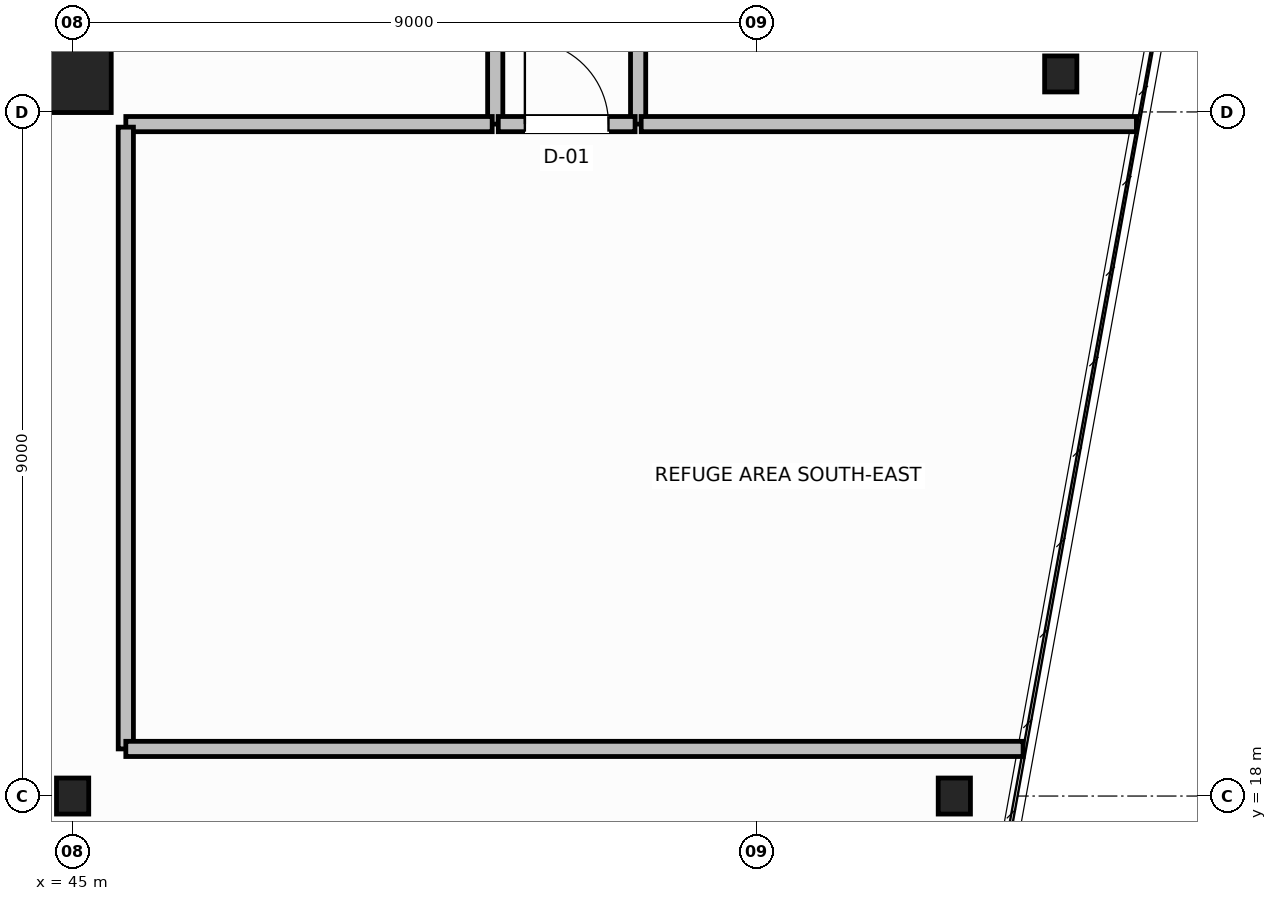
"""IFC4 building model, lengths in metres.
Left out: names, types, materials, properties, quantities, classifications, styles, units other than length and angle.
Written with IfcOpenShell. Run it as: python <this file> out.ifc"""

import sys

from ifc_helpers import new_model, si_unit, direction, frame, frame_2d, origin, origin_2d, place, context, subcontext, project, spatial, rectangle, hollow_circle, i_section, extrude, source, transform, mapped, element, fill, save


model = new_model("IFC4")
c1 = context("Model", 3, precision=1e-05, world=origin(), true_north=direction((0.0, 1.0)))
c2 = subcontext(c1, "Body", "Model", "MODEL_VIEW")
j1 = project(units=[si_unit("LENGTHUNIT", "METRE"), si_unit("PLANEANGLEUNIT", "RADIAN")], contexts=[c1])
p1 = place(None, origin())
s1 = spatial("IfcSite", under=j1, at=p1, CompositionType="ELEMENT")
p2 = place(p1, origin())
s2 = spatial("IfcBuilding", under=s1, at=p2, CompositionType="ELEMENT")
p3 = place(p2, frame((0.0, 0.0, 149.0)))
s3 = spatial("IfcBuildingStorey", under=s2, at=p3, CompositionType="ELEMENT", Elevation=149.0)
m1 = source(origin(), c2, "Body", "SweptSolid", [
    extrude(i_section(OverallWidth=0.424, OverallDepth=0.474, WebThickness=0.047, FlangeThickness=0.065, FilletRadius=0.015, at=origin_2d()), origin(), (0.0, 0.0, 1.0), 4.8),
])
for number, where, z_axis, x_axis in (
    (1, (58.0, 27.5, 0.0), (0.0, 0.0, 1.0), (1.0, 0.0, 0.0)),
    (2, (56.6, 18.0, 0.0), (0.0, 0.0, 1.0), (1.0, 0.0, 0.0)),
):
    element("IfcColumn", number, at=place(p3, frame(where, z_axis=z_axis, x_axis=x_axis)), inside=s3, PredefinedType="COLUMN", context=c2, shape_type="MappedRepresentation", body=[
        mapped(m1, transform((0.0, 0.0, 0.0), scale=1.0)),
    ])
m2 = source(origin(), c2, "Body", "SweptSolid", [
    extrude(hollow_circle(Radius=0.508, WallThickness=0.045, at=origin_2d()), origin(), (0.0, 0.0, 1.0), 4.8),
])
p4 = place(p3, frame((45.0, 27.5, 0.0), z_axis=(0.0, 0.0, 1.0), x_axis=(1.0, 0.0, 0.0)))
e3 = element("IfcColumn", 3, at=p4, inside=s3, PredefinedType="COLUMN", context=c2, shape_type="MappedRepresentation", body=[
    mapped(m2, transform((0.0, 0.0, 0.0), scale=1.0)),
])
m3 = source(origin(), c2, "Body", "SweptSolid", [
    extrude(i_section(OverallWidth=0.424, OverallDepth=0.474, WebThickness=0.047, FlangeThickness=0.065, FilletRadius=0.015, at=origin_2d()), origin(), (0.0, 0.0, 1.0), 4.8),
])
p5 = place(p3, frame((45.0, 18.0, 0.0), z_axis=(0.0, 0.0, 1.0), x_axis=(1.0, 0.0, 0.0)))
e4 = element("IfcColumn", 4, at=p5, inside=s3, PredefinedType="COLUMN", context=c2, shape_type="MappedRepresentation", body=[
    mapped(m3, transform((0.0, 0.0, 0.0), scale=1.0)),
])
p6 = place(p3, frame((50.56, 26.84, 0.0), z_axis=(0.0, 0.0, 1.0), x_axis=(0.0, 1.0, 0.0)))
e5 = element("IfcWall", 5, at=p6, inside=s3, PredefinedType="SOLIDWALL", context=c2, shape_type="SweptSolid", body=[
    extrude(rectangle(XDim=6.92, YDim=0.2, at=frame_2d((3.46, 0.0))), origin(), (0.0, 0.0, 1.0), 4.54),
])
p7 = place(p6, frame((3.0, 0.0, 0.0)))
e6 = element("IfcOpeningElement", 6, at=p7, cuts=e5, PredefinedType="OPENING", context=c2, shape_type="SweptSolid", body=[
    extrude(rectangle(XDim=1.1, YDim=2.15, at=frame_2d((0.55, 1.075))), frame((0.0, 0.11, 0.0), z_axis=(0.0, -1.0, 0.0), x_axis=(1.0, 0.0, 0.0)), (0.0, 0.0, 1.0), 0.22),
])
p8 = place(p3, frame((52.44, 26.84, 0.0), z_axis=(0.0, 0.0, 1.0), x_axis=(0.0, 1.0, 0.0)))
e7 = element("IfcWall", 7, at=p8, inside=s3, PredefinedType="SOLIDWALL", context=c2, shape_type="SweptSolid", body=[
    extrude(rectangle(XDim=6.92, YDim=0.2, at=frame_2d((3.46, 0.0))), origin(), (0.0, 0.0, 1.0), 4.54),
])
p9 = place(p3, frame((50.6, 26.84, 0.0), z_axis=(0.0, 0.0, 1.0), x_axis=(1.0, 0.0, 0.0)))
e8 = element("IfcWall", 8, at=p9, inside=s3, PredefinedType="SOLIDWALL", context=c2, shape_type="SweptSolid", body=[
    extrude(rectangle(XDim=1.8, YDim=0.2, at=frame_2d((0.9, 0.0))), origin(), (0.0, 0.0, 1.0), 4.54),
])
p10 = place(p9, frame((0.35, 0.0, 0.0)))
e9 = element("IfcOpeningElement", 9, at=p10, cuts=e8, PredefinedType="OPENING", context=c2, shape_type="SweptSolid", body=[
    extrude(rectangle(XDim=1.1, YDim=2.15, at=frame_2d((0.55, 1.075))), frame((0.0, 0.11, 0.0), z_axis=(0.0, -1.0, 0.0), x_axis=(1.0, 0.0, 0.0)), (0.0, 0.0, 1.0), 0.22),
])
p11 = place(p3, frame((45.7, 26.84, 0.0), z_axis=(0.0, 0.0, 1.0), x_axis=(1.0, 0.0, 0.0)))
e10 = element("IfcWall", 10, at=p11, inside=s3, PredefinedType="SOLIDWALL", context=c2, shape_type="SweptSolid", body=[
    extrude(rectangle(XDim=4.82, YDim=0.2, at=frame_2d((2.41, 0.0))), origin(), (0.0, 0.0, 1.0), 4.54),
])
p12 = place(p3, frame((52.48, 26.84, 0.0), z_axis=(0.0, 0.0, 1.0), x_axis=(1.0, 0.0, 0.0)))
e11 = element("IfcWall", 11, at=p12, inside=s3, PredefinedType="SOLIDWALL", context=c2, shape_type="SweptSolid", body=[
    extrude(rectangle(XDim=6.516, YDim=0.2, at=frame_2d((3.258, 0.0))), origin(), (0.0, 0.0, 1.0), 4.54),
])
p13 = place(p3, frame((45.7, 18.62, 0.0), z_axis=(0.0, 0.0, 1.0), x_axis=(0.0, 1.0, 0.0)))
e12 = element("IfcWall", 12, at=p13, inside=s3, PredefinedType="SOLIDWALL", context=c2, shape_type="SweptSolid", body=[
    extrude(rectangle(XDim=8.18, YDim=0.2, at=frame_2d((4.09, 0.0))), origin(), (0.0, 0.0, 1.0), 4.54),
])
p14 = place(p3, frame((45.7, 18.62, 0.0), z_axis=(0.0, 0.0, 1.0), x_axis=(1.0, 0.0, 0.0)))
e13 = element("IfcWall", 13, at=p14, inside=s3, PredefinedType="SOLIDWALL", context=c2, shape_type="SweptSolid", body=[
    extrude(rectangle(XDim=11.805, YDim=0.2, at=frame_2d((5.902, 0.0))), origin(), (0.0, 0.0, 1.0), 4.54),
])
m4 = source(origin(), c2, "Body", "SweptSolid", [
    extrude(rectangle(XDim=1.1, YDim=2.15, at=frame_2d((0.55, 1.075))), frame((0.0, 0.025, 0.0), z_axis=(0.0, -1.0, 0.0), x_axis=(1.0, 0.0, 0.0)), (0.0, 0.0, 1.0), 0.05),
])
p15 = place(p10, origin())
e14 = element("IfcDoor", 14, at=p15, inside=s3, OperationType="SINGLE_SWING_RIGHT", PredefinedType="DOOR", context=c2, shape_type="MappedRepresentation", body=[
    mapped(m4, transform((0.0, 0.0, 0.0), scale=1.0)),
])
fill(e9, e14)
save(model, sys.argv[1])
